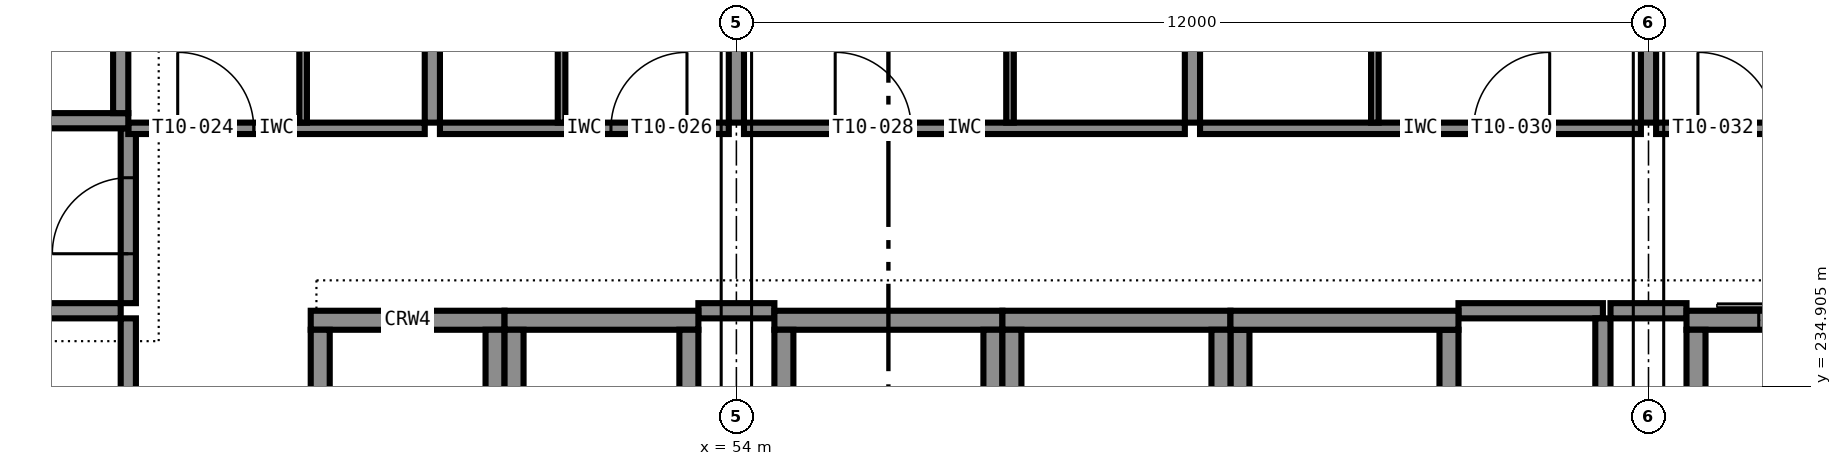
"""IFC4 building model, lengths in metres.
Left out: names, types, materials, properties, quantities, classifications, styles, units other than length and angle.
Written with IfcOpenShell. Run it as: python <this file> out.ifc"""

import sys

from ifc_helpers import new_model, si_unit, direction, frame, frame_2d, origin, place, context, subcontext, project, spatial, rectangle, extrude, element, fill, save


model = new_model("IFC4")
c1 = context("Model", 3, precision=1e-05, world=origin(), true_north=direction((0.0, 1.0)))
c2 = subcontext(c1, "Body", "Model", "MODEL_VIEW")
j1 = project(units=[si_unit("LENGTHUNIT", "METRE"), si_unit("PLANEANGLEUNIT", "RADIAN")], contexts=[c1])
p1 = place(None, origin())
s1 = spatial("IfcSite", under=j1, at=p1, CompositionType="ELEMENT")
p2 = place(p1, origin())
s2 = spatial("IfcBuilding", under=s1, at=p2, CompositionType="ELEMENT")
p3 = place(p2, frame((0.0, 0.0, 49.8)))
s3 = spatial("IfcBuildingStorey", under=s2, at=p3, CompositionType="ELEMENT", Elevation=49.8)
p4 = place(p3, frame((54.5, 235.775, 0.0), z_axis=(0.0, 0.0, 1.0), x_axis=(1.0, 0.0, 0.0)))
e1 = element("IfcWall", 1, at=p4, inside=s3, PredefinedType="SHEAR", context=c2, shape_type="SweptSolid", body=[
    extrude(rectangle(XDim=3.0, YDim=0.25, at=frame_2d((1.5, 0.0))), origin(), (0.0, 0.0, 1.0), 3.6),
])
for number, where, z_axis, x_axis in (
    (2, (54.625, 232.35, 0.0), (0.0, 0.0, 1.0), (0.0, 1.0, 0.0)),
    (3, (57.375, 232.35, 0.0), (0.0, 0.0, 1.0), (0.0, 1.0, 0.0)),
):
    element("IfcWall", number, at=place(p3, frame(where, z_axis=z_axis, x_axis=x_axis)), inside=s3, PredefinedType="SHEAR", context=c2, shape_type="SweptSolid", body=[
        extrude(rectangle(XDim=3.3, YDim=0.25, at=frame_2d((1.65, 0.0))), origin(), (0.0, 0.0, 1.0), 3.6),
    ])
p5 = place(p3, frame((57.5, 235.775, 0.0), z_axis=(0.0, 0.0, 1.0), x_axis=(1.0, 0.0, 0.0)))
e4 = element("IfcWall", 4, at=p5, inside=s3, PredefinedType="SHEAR", context=c2, shape_type="SweptSolid", body=[
    extrude(rectangle(XDim=3.0, YDim=0.25, at=frame_2d((1.5, 0.0))), origin(), (0.0, 0.0, 1.0), 3.6),
])
for number, where, z_axis, x_axis in (
    (5, (57.625, 232.35, 0.0), (0.0, 0.0, 1.0), (0.0, 1.0, 0.0)),
    (6, (60.375, 232.35, 0.0), (0.0, 0.0, 1.0), (0.0, 1.0, 0.0)),
):
    element("IfcWall", number, at=place(p3, frame(where, z_axis=z_axis, x_axis=x_axis)), inside=s3, PredefinedType="SHEAR", context=c2, shape_type="SweptSolid", body=[
        extrude(rectangle(XDim=3.3, YDim=0.25, at=frame_2d((1.65, 0.0))), origin(), (0.0, 0.0, 1.0), 3.6),
    ])
p6 = place(p3, frame((60.5, 235.775, 0.0), z_axis=(0.0, 0.0, 1.0), x_axis=(1.0, 0.0, 0.0)))
e7 = element("IfcWall", 7, at=p6, inside=s3, PredefinedType="SHEAR", context=c2, shape_type="SweptSolid", body=[
    extrude(rectangle(XDim=3.0, YDim=0.25, at=frame_2d((1.5, 0.0))), origin(), (0.0, 0.0, 1.0), 3.6),
])
for number, where, z_axis, x_axis in (
    (8, (60.625, 232.35, 0.0), (0.0, 0.0, 1.0), (0.0, 1.0, 0.0)),
    (9, (63.375, 232.35, 0.0), (0.0, 0.0, 1.0), (0.0, 1.0, 0.0)),
):
    element("IfcWall", number, at=place(p3, frame(where, z_axis=z_axis, x_axis=x_axis)), inside=s3, PredefinedType="SHEAR", context=c2, shape_type="SweptSolid", body=[
        extrude(rectangle(XDim=3.3, YDim=0.25, at=frame_2d((1.65, 0.0))), origin(), (0.0, 0.0, 1.0), 3.6),
    ])
p7 = place(p3, frame((66.5, 235.775, 0.0), z_axis=(0.0, 0.0, 1.0), x_axis=(1.0, 0.0, 0.0)))
e10 = element("IfcWall", 10, at=p7, inside=s3, PredefinedType="SHEAR", context=c2, shape_type="SweptSolid", body=[
    extrude(rectangle(XDim=3.0, YDim=0.25, at=frame_2d((1.5, 0.0))), origin(), (0.0, 0.0, 1.0), 3.6),
])
p8 = place(p7, frame((0.95, 0.0, 0.0)))
e11 = element("IfcOpeningElement", 11, at=p8, cuts=e10, PredefinedType="OPENING", context=c2, shape_type="SweptSolid", body=[
    extrude(rectangle(XDim=1.1, YDim=2.1, at=frame_2d((0.55, 1.05))), frame((0.0, 0.135, 0.0), z_axis=(0.0, -1.0, 0.0), x_axis=(1.0, 0.0, 0.0)), (0.0, 0.0, 1.0), 0.27),
])
p9 = place(p3, frame((66.625, 232.35, 0.0), z_axis=(0.0, 0.0, 1.0), x_axis=(0.0, 1.0, 0.0)))
e12 = element("IfcWall", 12, at=p9, inside=s3, PredefinedType="SHEAR", context=c2, shape_type="SweptSolid", body=[
    extrude(rectangle(XDim=3.3, YDim=0.25, at=frame_2d((1.65, 0.0))), origin(), (0.0, 0.0, 1.0), 3.6),
])
p10 = place(p3, frame((48.4, 235.775, 0.0), z_axis=(0.0, 0.0, 1.0), x_axis=(1.0, 0.0, 0.0)))
e13 = element("IfcWall", 13, at=p10, inside=s3, PredefinedType="SHEAR", context=c2, shape_type="SweptSolid", body=[
    extrude(rectangle(XDim=2.55, YDim=0.25, at=frame_2d((1.275, 0.0))), origin(), (0.0, 0.0, 1.0), 3.6),
])
for number, where, z_axis, x_axis in (
    (14, (48.525, 232.35, 0.0), (0.0, 0.0, 1.0), (0.0, 1.0, 0.0)),
    (15, (50.825, 232.35, 0.0), (0.0, 0.0, 1.0), (0.0, 1.0, 0.0)),
):
    element("IfcWall", number, at=place(p3, frame(where, z_axis=z_axis, x_axis=x_axis)), inside=s3, PredefinedType="SHEAR", context=c2, shape_type="SweptSolid", body=[
        extrude(rectangle(XDim=3.3, YDim=0.25, at=frame_2d((1.65, 0.0))), origin(), (0.0, 0.0, 1.0), 3.6),
    ])
p11 = place(p3, frame((50.95, 235.775, 0.0), z_axis=(0.0, 0.0, 1.0), x_axis=(1.0, 0.0, 0.0)))
e16 = element("IfcWall", 16, at=p11, inside=s3, PredefinedType="SHEAR", context=c2, shape_type="SweptSolid", body=[
    extrude(rectangle(XDim=2.55, YDim=0.25, at=frame_2d((1.275, 0.0))), origin(), (0.0, 0.0, 1.0), 3.6),
])
for number, where, z_axis, x_axis in (
    (17, (51.075, 232.35, 0.0), (0.0, 0.0, 1.0), (0.0, 1.0, 0.0)),
    (18, (53.375, 232.35, 0.0), (0.0, 0.0, 1.0), (0.0, 1.0, 0.0)),
):
    element("IfcWall", number, at=place(p3, frame(where, z_axis=z_axis, x_axis=x_axis)), inside=s3, PredefinedType="SHEAR", context=c2, shape_type="SweptSolid", body=[
        extrude(rectangle(XDim=3.3, YDim=0.25, at=frame_2d((1.65, 0.0))), origin(), (0.0, 0.0, 1.0), 3.6),
    ])
p12 = place(p3, frame((42.5, 238.4, 0.0), z_axis=(0.0, 0.0, 1.0), x_axis=(1.0, 0.0, 0.0)))
e19 = element("IfcWall", 19, at=p12, inside=s3, PredefinedType="SHEAR", context=c2, shape_type="SweptSolid", body=[
    extrude(rectangle(XDim=3.5, YDim=0.2, at=frame_2d((1.75, 0.0))), origin(), (0.0, 0.0, 1.0), 3.6),
])
p13 = place(p12, frame((1.15, 0.0, 0.0)))
e20 = element("IfcOpeningElement", 20, at=p13, cuts=e19, PredefinedType="OPENING", context=c2, shape_type="SweptSolid", body=[
    extrude(rectangle(XDim=1.2, YDim=2.1, at=frame_2d((0.6, 1.05))), frame((0.0, 0.11, 0.0), z_axis=(0.0, -1.0, 0.0), x_axis=(1.0, 0.0, 0.0)), (0.0, 0.0, 1.0), 0.22),
])
p14 = place(p3, frame((45.9, 238.5, 0.0), z_axis=(0.0, 0.0, 1.0), x_axis=(0.0, 1.0, 0.0)))
e21 = element("IfcWall", 21, at=p14, inside=s3, PredefinedType="SHEAR", context=c2, shape_type="SweptSolid", body=[
    extrude(rectangle(XDim=7.0, YDim=0.2, at=frame_2d((3.5, 0.0))), origin(), (0.0, 0.0, 1.0), 3.6),
])
p15 = place(p3, frame((42.3, 235.9, 0.0), z_axis=(0.0, 0.0, 1.0), x_axis=(1.0, 0.0, 0.0)))
e22 = element("IfcWall", 22, at=p15, inside=s3, PredefinedType="PARTITIONING", context=c2, shape_type="SweptSolid", body=[
    extrude(rectangle(XDim=3.6, YDim=0.2, at=frame_2d((1.8, 0.0))), origin(), (0.0, 0.0, 1.0), 3.4),
])
p16 = place(p3, frame((53.5, 235.9, 0.0), z_axis=(0.0, 0.0, 1.0), x_axis=(1.0, 0.0, 0.0)))
e23 = element("IfcWall", 23, at=p16, inside=s3, PredefinedType="PARTITIONING", context=c2, shape_type="SweptSolid", body=[
    extrude(rectangle(XDim=1.0, YDim=0.2, at=frame_2d((0.5, 0.0))), origin(), (0.0, 0.0, 1.0), 3.4),
])
p17 = place(p3, frame((63.5, 235.9, 0.0), z_axis=(0.0, 0.0, 1.0), x_axis=(1.0, 0.0, 0.0)))
e24 = element("IfcWall", 24, at=p17, inside=s3, PredefinedType="PARTITIONING", context=c2, shape_type="SweptSolid", body=[
    extrude(rectangle(XDim=1.9, YDim=0.2, at=frame_2d((0.95, 0.0))), origin(), (0.0, 0.0, 1.0), 3.4),
])
p18 = place(p3, frame((65.5, 235.9, 0.0), z_axis=(0.0, 0.0, 1.0), x_axis=(1.0, 0.0, 0.0)))
e25 = element("IfcWall", 25, at=p18, inside=s3, PredefinedType="PARTITIONING", context=c2, shape_type="SweptSolid", body=[
    extrude(rectangle(XDim=1.0, YDim=0.2, at=frame_2d((0.5, 0.0))), origin(), (0.0, 0.0, 1.0), 3.4),
])
p19 = place(p3, frame((46.0, 232.2, 0.0), z_axis=(0.0, 0.0, 1.0), x_axis=(0.0, 1.0, 0.0)))
e26 = element("IfcWall", 26, at=p19, inside=s3, PredefinedType="PARTITIONING", context=c2, shape_type="SweptSolid", body=[
    extrude(rectangle(XDim=3.6, YDim=0.2, at=frame_2d((1.8, 0.0))), origin(), (0.0, 0.0, 1.0), 3.4),
])
p20 = place(p19, frame((1.35, 0.0, 0.0)))
e27 = element("IfcOpeningElement", 27, at=p20, cuts=e26, PredefinedType="OPENING", context=c2, shape_type="SweptSolid", body=[
    extrude(rectangle(XDim=0.9, YDim=2.1, at=frame_2d((0.45, 1.05))), frame((0.0, 0.11, 0.0), z_axis=(0.0, -1.0, 0.0), x_axis=(1.0, 0.0, 0.0)), (0.0, 0.0, 1.0), 0.22),
])
p21 = place(p3, frame((46.0, 236.0, 0.0), z_axis=(0.0, 0.0, 1.0), x_axis=(0.0, 1.0, 0.0)))
e28 = element("IfcWall", 28, at=p21, inside=s3, PredefinedType="PARTITIONING", context=c2, shape_type="SweptSolid", body=[
    extrude(rectangle(XDim=2.3, YDim=0.2, at=frame_2d((1.15, 0.0))), origin(), (0.0, 0.0, 1.0), 3.4),
])
p22 = place(p21, frame((0.65, 0.0, 0.0)))
e29 = element("IfcOpeningElement", 29, at=p22, cuts=e28, PredefinedType="OPENING", context=c2, shape_type="SweptSolid", body=[
    extrude(rectangle(XDim=1.0, YDim=2.1, at=frame_2d((0.5, 1.05))), frame((0.0, 0.11, 0.0), z_axis=(0.0, -1.0, 0.0), x_axis=(1.0, 0.0, 0.0)), (0.0, 0.0, 1.0), 0.22),
])
p23 = place(p3, frame((65.4, 232.2, 0.0), z_axis=(0.0, 0.0, 1.0), x_axis=(0.0, 1.0, 0.0)))
e30 = element("IfcWall", 30, at=p23, inside=s3, PredefinedType="PARTITIONING", context=c2, shape_type="SweptSolid", body=[
    extrude(rectangle(XDim=3.6, YDim=0.2, at=frame_2d((1.8, 0.0))), origin(), (0.0, 0.0, 1.0), 3.4),
])
p24 = place(p3, frame((46.0, 238.3, 0.0), z_axis=(0.0, 0.0, 1.0), x_axis=(1.0, 0.0, 0.0)))
e31 = element("IfcWall", 31, at=p24, inside=s3, PredefinedType="PARTITIONING", context=c2, shape_type="SweptSolid", body=[
    extrude(rectangle(XDim=3.9, YDim=0.15, at=frame_2d((1.95, 0.0))), origin(), (0.0, 0.0, 1.0), 3.4),
])
p25 = place(p24, frame((0.65, 0.0, 0.0)))
e32 = element("IfcOpeningElement", 32, at=p25, cuts=e31, PredefinedType="OPENING", context=c2, shape_type="SweptSolid", body=[
    extrude(rectangle(XDim=1.0, YDim=2.1, at=frame_2d((0.5, 1.05))), frame((0.0, 0.085, 0.0), z_axis=(0.0, -1.0, 0.0), x_axis=(1.0, 0.0, 0.0)), (0.0, 0.0, 1.0), 0.17),
])
p26 = place(p3, frame((48.3, 238.375, 0.0), z_axis=(0.0, 0.0, 1.0), x_axis=(0.0, 1.0, 0.0)))
e33 = element("IfcWall", 33, at=p26, inside=s3, PredefinedType="PARTITIONING", context=c2, shape_type="SweptSolid", body=[
    extrude(rectangle(XDim=2.875, YDim=0.1, at=frame_2d((1.438, 0.0))), origin(), (0.0, 0.0, 1.0), 3.4),
])
p27 = place(p26, frame((1.038, 0.0, 0.0)))
e34 = element("IfcOpeningElement", 34, at=p27, cuts=e33, PredefinedType="OPENING", context=c2, shape_type="SweptSolid", body=[
    extrude(rectangle(XDim=0.8, YDim=2.1, at=frame_2d((0.4, 1.05))), frame((0.0, 0.06, 0.0), z_axis=(0.0, -1.0, 0.0), x_axis=(1.0, 0.0, 0.0)), (0.0, 0.0, 1.0), 0.12),
])
p28 = place(p3, frame((50.1, 238.3, 0.0), z_axis=(0.0, 0.0, 1.0), x_axis=(1.0, 0.0, 0.0)))
e35 = element("IfcWall", 35, at=p28, inside=s3, PredefinedType="PARTITIONING", context=c2, shape_type="SweptSolid", body=[
    extrude(rectangle(XDim=3.8, YDim=0.15, at=frame_2d((1.9, 0.0))), origin(), (0.0, 0.0, 1.0), 3.4),
])
p29 = place(p28, frame((2.25, 0.0, 0.0)))
e36 = element("IfcOpeningElement", 36, at=p29, cuts=e35, PredefinedType="OPENING", context=c2, shape_type="SweptSolid", body=[
    extrude(rectangle(XDim=1.0, YDim=2.1, at=frame_2d((0.5, 1.05))), frame((0.0, 0.085, 0.0), z_axis=(0.0, -1.0, 0.0), x_axis=(1.0, 0.0, 0.0)), (0.0, 0.0, 1.0), 0.17),
])
p30 = place(p3, frame((51.7, 241.25, 0.0), z_axis=(0.0, 0.0, 1.0), x_axis=(0.0, -1.0, 0.0)))
e37 = element("IfcWall", 37, at=p30, inside=s3, PredefinedType="PARTITIONING", context=c2, shape_type="SweptSolid", body=[
    extrude(rectangle(XDim=2.875, YDim=0.1, at=frame_2d((1.438, 0.0))), origin(), (0.0, 0.0, 1.0), 3.4),
])
p31 = place(p30, frame((1.038, 0.0, 0.0)))
e38 = element("IfcOpeningElement", 38, at=p31, cuts=e37, PredefinedType="OPENING", context=c2, shape_type="SweptSolid", body=[
    extrude(rectangle(XDim=0.8, YDim=2.1, at=frame_2d((0.4, 1.05))), frame((0.0, 0.06, 0.0), z_axis=(0.0, -1.0, 0.0), x_axis=(1.0, 0.0, 0.0)), (0.0, 0.0, 1.0), 0.12),
])
p32 = place(p3, frame((54.1, 238.3, 0.0), z_axis=(0.0, 0.0, 1.0), x_axis=(1.0, 0.0, 0.0)))
e39 = element("IfcWall", 39, at=p32, inside=s3, PredefinedType="PARTITIONING", context=c2, shape_type="SweptSolid", body=[
    extrude(rectangle(XDim=5.8, YDim=0.15, at=frame_2d((2.9, 0.0))), origin(), (0.0, 0.0, 1.0), 3.4),
])
p33 = place(p32, frame((1.2, 0.0, 0.0)))
e40 = element("IfcOpeningElement", 40, at=p33, cuts=e39, PredefinedType="OPENING", context=c2, shape_type="SweptSolid", body=[
    extrude(rectangle(XDim=1.0, YDim=2.1, at=frame_2d((0.5, 1.05))), frame((0.0, 0.085, 0.0), z_axis=(0.0, -1.0, 0.0), x_axis=(1.0, 0.0, 0.0)), (0.0, 0.0, 1.0), 0.17),
])
p34 = place(p3, frame((57.6, 238.375, 0.0), z_axis=(0.0, 0.0, 1.0), x_axis=(0.0, 1.0, 0.0)))
e41 = element("IfcWall", 41, at=p34, inside=s3, PredefinedType="PARTITIONING", context=c2, shape_type="SweptSolid", body=[
    extrude(rectangle(XDim=2.875, YDim=0.1, at=frame_2d((1.438, 0.0))), origin(), (0.0, 0.0, 1.0), 3.4),
])
p35 = place(p34, frame((1.038, 0.0, 0.0)))
e42 = element("IfcOpeningElement", 42, at=p35, cuts=e41, PredefinedType="OPENING", context=c2, shape_type="SweptSolid", body=[
    extrude(rectangle(XDim=0.8, YDim=2.1, at=frame_2d((0.4, 1.05))), frame((0.0, 0.06, 0.0), z_axis=(0.0, -1.0, 0.0), x_axis=(1.0, 0.0, 0.0)), (0.0, 0.0, 1.0), 0.12),
])
p36 = place(p3, frame((60.1, 238.3, 0.0), z_axis=(0.0, 0.0, 1.0), x_axis=(1.0, 0.0, 0.0)))
e43 = element("IfcWall", 43, at=p36, inside=s3, PredefinedType="PARTITIONING", context=c2, shape_type="SweptSolid", body=[
    extrude(rectangle(XDim=5.8, YDim=0.15, at=frame_2d((2.9, 0.0))), origin(), (0.0, 0.0, 1.0), 3.4),
])
p37 = place(p36, frame((3.6, 0.0, 0.0)))
e44 = element("IfcOpeningElement", 44, at=p37, cuts=e43, PredefinedType="OPENING", context=c2, shape_type="SweptSolid", body=[
    extrude(rectangle(XDim=1.0, YDim=2.1, at=frame_2d((0.5, 1.05))), frame((0.0, 0.085, 0.0), z_axis=(0.0, -1.0, 0.0), x_axis=(1.0, 0.0, 0.0)), (0.0, 0.0, 1.0), 0.17),
])
p38 = place(p3, frame((62.4, 241.25, 0.0), z_axis=(0.0, 0.0, 1.0), x_axis=(0.0, -1.0, 0.0)))
e45 = element("IfcWall", 45, at=p38, inside=s3, PredefinedType="PARTITIONING", context=c2, shape_type="SweptSolid", body=[
    extrude(rectangle(XDim=2.875, YDim=0.1, at=frame_2d((1.438, 0.0))), origin(), (0.0, 0.0, 1.0), 3.4),
])
p39 = place(p38, frame((1.038, 0.0, 0.0)))
e46 = element("IfcOpeningElement", 46, at=p39, cuts=e45, PredefinedType="OPENING", context=c2, shape_type="SweptSolid", body=[
    extrude(rectangle(XDim=0.8, YDim=2.1, at=frame_2d((0.4, 1.05))), frame((0.0, 0.06, 0.0), z_axis=(0.0, -1.0, 0.0), x_axis=(1.0, 0.0, 0.0)), (0.0, 0.0, 1.0), 0.12),
])
p40 = place(p3, frame((66.1, 238.3, 0.0), z_axis=(0.0, 0.0, 1.0), x_axis=(1.0, 0.0, 0.0)))
e47 = element("IfcWall", 47, at=p40, inside=s3, PredefinedType="PARTITIONING", context=c2, shape_type="SweptSolid", body=[
    extrude(rectangle(XDim=3.8, YDim=0.15, at=frame_2d((1.9, 0.0))), origin(), (0.0, 0.0, 1.0), 3.4),
])
p41 = place(p40, frame((0.55, 0.0, 0.0)))
e48 = element("IfcOpeningElement", 48, at=p41, cuts=e47, PredefinedType="OPENING", context=c2, shape_type="SweptSolid", body=[
    extrude(rectangle(XDim=1.0, YDim=2.1, at=frame_2d((0.5, 1.05))), frame((0.0, 0.085, 0.0), z_axis=(0.0, -1.0, 0.0), x_axis=(1.0, 0.0, 0.0)), (0.0, 0.0, 1.0), 0.17),
])
p42 = place(p3, frame((50.0, 245.7, 0.0), z_axis=(0.0, 0.0, 1.0), x_axis=(0.0, -1.0, 0.0)))
e49 = element("IfcWall", 49, at=p42, inside=s3, PredefinedType="PARTITIONING", context=c2, shape_type="SweptSolid", body=[
    extrude(rectangle(XDim=7.325, YDim=0.2, at=frame_2d((3.663, 0.0))), origin(), (0.0, 0.0, 1.0), 3.4),
])
p43 = place(p3, frame((54.0, 245.65, 0.0), z_axis=(0.0, 0.0, 1.0), x_axis=(0.0, -1.0, 0.0)))
e50 = element("IfcWall", 50, at=p43, inside=s3, PredefinedType="PARTITIONING", context=c2, shape_type="SweptSolid", body=[
    extrude(rectangle(XDim=7.275, YDim=0.2, at=frame_2d((3.637, 0.0))), origin(), (0.0, 0.0, 1.0), 2.6),
])
p44 = place(p3, frame((60.0, 245.7, 0.0), z_axis=(0.0, 0.0, 1.0), x_axis=(0.0, -1.0, 0.0)))
e51 = element("IfcWall", 51, at=p44, inside=s3, PredefinedType="PARTITIONING", context=c2, shape_type="SweptSolid", body=[
    extrude(rectangle(XDim=7.325, YDim=0.2, at=frame_2d((3.663, 0.0))), origin(), (0.0, 0.0, 1.0), 3.4),
])
p45 = place(p3, frame((66.0, 245.65, 0.0), z_axis=(0.0, 0.0, 1.0), x_axis=(0.0, -1.0, 0.0)))
e52 = element("IfcWall", 52, at=p45, inside=s3, PredefinedType="PARTITIONING", context=c2, shape_type="SweptSolid", body=[
    extrude(rectangle(XDim=7.275, YDim=0.2, at=frame_2d((3.637, 0.0))), origin(), (0.0, 0.0, 1.0), 2.6),
])
p46 = place(p22, origin())
e53 = element("IfcDoor", 53, at=p46, inside=s3, OperationType="SINGLE_SWING_LEFT", PredefinedType="DOOR", context=c2, shape_type="SweptSolid", body=[
    extrude(rectangle(XDim=1.0, YDim=2.1, at=frame_2d((0.5, 1.05))), frame((0.0, 0.025, 0.0), z_axis=(0.0, -1.0, 0.0), x_axis=(1.0, 0.0, 0.0)), (0.0, 0.0, 1.0), 0.05),
])
fill(e29, e53)
p47 = place(p25, origin())
e54 = element("IfcDoor", 54, at=p47, inside=s3, OperationType="SINGLE_SWING_LEFT", PredefinedType="DOOR", context=c2, shape_type="SweptSolid", body=[
    extrude(rectangle(XDim=1.0, YDim=2.1, at=frame_2d((0.5, 1.05))), frame((0.0, 0.025, 0.0), z_axis=(0.0, -1.0, 0.0), x_axis=(1.0, 0.0, 0.0)), (0.0, 0.0, 1.0), 0.05),
])
fill(e32, e54)
p48 = place(p29, origin())
e55 = element("IfcDoor", 55, at=p48, inside=s3, OperationType="SINGLE_SWING_RIGHT", PredefinedType="DOOR", context=c2, shape_type="SweptSolid", body=[
    extrude(rectangle(XDim=1.0, YDim=2.1, at=frame_2d((0.5, 1.05))), frame((0.0, 0.025, 0.0), z_axis=(0.0, -1.0, 0.0), x_axis=(1.0, 0.0, 0.0)), (0.0, 0.0, 1.0), 0.05),
])
fill(e36, e55)
p49 = place(p33, origin())
e56 = element("IfcDoor", 56, at=p49, inside=s3, OperationType="SINGLE_SWING_LEFT", PredefinedType="DOOR", context=c2, shape_type="SweptSolid", body=[
    extrude(rectangle(XDim=1.0, YDim=2.1, at=frame_2d((0.5, 1.05))), frame((0.0, 0.025, 0.0), z_axis=(0.0, -1.0, 0.0), x_axis=(1.0, 0.0, 0.0)), (0.0, 0.0, 1.0), 0.05),
])
fill(e40, e56)
p50 = place(p37, origin())
e57 = element("IfcDoor", 57, at=p50, inside=s3, OperationType="SINGLE_SWING_RIGHT", PredefinedType="DOOR", context=c2, shape_type="SweptSolid", body=[
    extrude(rectangle(XDim=1.0, YDim=2.1, at=frame_2d((0.5, 1.05))), frame((0.0, 0.025, 0.0), z_axis=(0.0, -1.0, 0.0), x_axis=(1.0, 0.0, 0.0)), (0.0, 0.0, 1.0), 0.05),
])
fill(e44, e57)
p51 = place(p41, origin())
e58 = element("IfcDoor", 58, at=p51, inside=s3, OperationType="SINGLE_SWING_LEFT", PredefinedType="DOOR", context=c2, shape_type="SweptSolid", body=[
    extrude(rectangle(XDim=1.0, YDim=2.1, at=frame_2d((0.5, 1.05))), frame((0.0, 0.025, 0.0), z_axis=(0.0, -1.0, 0.0), x_axis=(1.0, 0.0, 0.0)), (0.0, 0.0, 1.0), 0.05),
])
fill(e48, e58)
p52 = place(p8, origin())
e59 = element("IfcDoor", 59, at=p52, inside=s3, OperationType="SLIDING_TO_LEFT", PredefinedType="DOOR", context=c2, shape_type="SweptSolid", body=[
    extrude(rectangle(XDim=1.1, YDim=2.1, at=frame_2d((0.55, 1.05))), frame((0.0, 0.025, 0.0), z_axis=(0.0, -1.0, 0.0), x_axis=(1.0, 0.0, 0.0)), (0.0, 0.0, 1.0), 0.05),
])
fill(e11, e59)
save(model, sys.argv[1])
